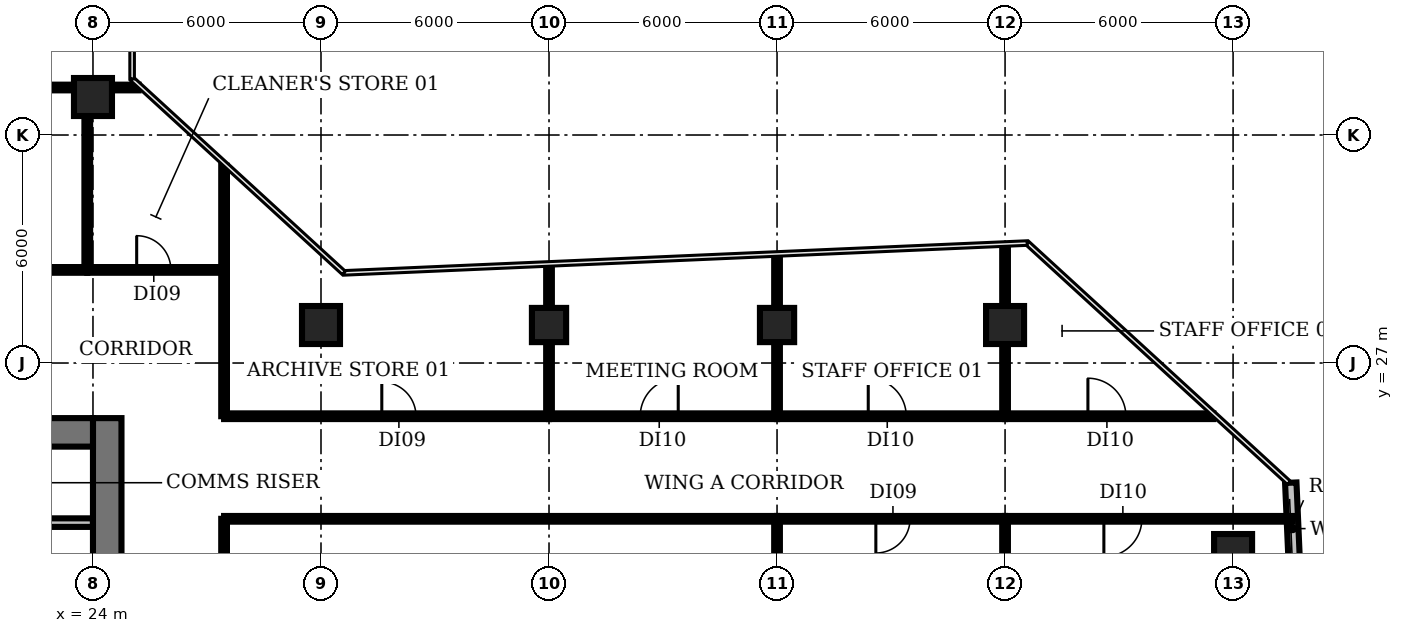
"""IFC4 building model, lengths in metres.
Left out: names, types, materials, properties, quantities, classifications, styles, units other than length and angle.
Written with IfcOpenShell. Run it as: python <this file> out.ifc"""

import sys

from ifc_helpers import new_model, si_unit, direction, frame, frame_2d, origin, origin_2d, place, context, subcontext, project, spatial, rectangle, circle, extrude, element, fill, save


model = new_model("IFC4")
c1 = context("Model", 3, precision=1e-05, world=origin(), true_north=direction((0.0, 1.0)))
c2 = subcontext(c1, "Body", "Model", "MODEL_VIEW")
j1 = project(units=[si_unit("LENGTHUNIT", "METRE"), si_unit("PLANEANGLEUNIT", "RADIAN")], contexts=[c1])
p1 = place(None, origin())
s1 = spatial("IfcSite", under=j1, at=p1, CompositionType="ELEMENT")
p2 = place(p1, origin())
s2 = spatial("IfcBuilding", under=s1, at=p2, CompositionType="ELEMENT")
p3 = place(p2, frame((0.0, 0.0, 100.4)))
s3 = spatial("IfcBuildingStorey", under=s2, at=p3, CompositionType="ELEMENT", Elevation=100.4)
for number, where, z_axis, x_axis in (
    (1, (24.0, 34.0, 0.0), (0.0, 0.0, 1.0), (1.0, 0.0, 0.0)),
    (2, (30.0, 28.0, 0.0), (0.0, 0.0, 1.0), (1.0, 0.0, 0.0)),
):
    element("IfcColumn", number, at=place(p3, frame(where, z_axis=z_axis, x_axis=x_axis)), inside=s3, PredefinedType="COLUMN", context=c2, shape_type="SweptSolid", body=[
        extrude(circle(Radius=0.5, at=origin_2d()), origin(), (0.0, 0.0, 1.0), 3.85),
    ])
for number, where, z_axis, x_axis in (
    (3, (36.0, 28.0, 0.0), (0.0, 0.0, 1.0), (1.0, 0.0, 0.0)),
    (4, (42.0, 28.0, 0.0), (0.0, 0.0, 1.0), (1.0, 0.0, 0.0)),
):
    element("IfcColumn", number, at=place(p3, frame(where, z_axis=z_axis, x_axis=x_axis)), inside=s3, PredefinedType="COLUMN", context=c2, shape_type="SweptSolid", body=[
        extrude(rectangle(XDim=0.9, YDim=0.9, at=origin_2d()), origin(), (0.0, 0.0, 1.0), 3.85),
    ])
for number, where, z_axis, x_axis in (
    (5, (48.0, 28.0, 0.0), (0.0, 0.0, 1.0), (1.0, 0.0, 0.0)),
    (6, (54.0, 22.0, 0.0), (0.0, 0.0, 1.0), (1.0, 0.0, 0.0)),
):
    element("IfcColumn", number, at=place(p3, frame(where, z_axis=z_axis, x_axis=x_axis)), inside=s3, PredefinedType="COLUMN", context=c2, shape_type="SweptSolid", body=[
        extrude(circle(Radius=0.5, at=origin_2d()), origin(), (0.0, 0.0, 1.0), 3.85),
    ])
p4 = place(p3, frame((55.623, 21.435, 0.0), z_axis=(0.0, 0.0, 1.0), x_axis=(-0.043625665955, 0.999047947433, 0.0)))
e7 = element("IfcWall", 7, at=p4, inside=s3, PredefinedType="SOLIDWALL", context=c2, shape_type="SweptSolid", body=[
    extrude(rectangle(XDim=2.417, YDim=0.3, at=frame_2d((1.209, 0.0))), origin(), (0.0, 0.0, 1.0), 3.85),
])
p5 = place(p3, frame((9.4, 22.8, 0.0), z_axis=(0.0, 0.0, 1.0), x_axis=(1.0, 0.0, 0.0)))
e8 = element("IfcWall", 8, at=p5, inside=s3, PredefinedType="PARTITIONING", context=c2, shape_type="SweptSolid", body=[
    extrude(rectangle(XDim=14.6, YDim=0.225, at=frame_2d((7.3, 0.0))), origin(), (0.0, 0.0, 1.0), 3.85),
])
p6 = place(p3, frame((24.375, 25.55, 0.0), z_axis=(0.0, 0.0, 1.0), x_axis=(0.0, -1.0, 0.0)))
e9 = element("IfcWall", 9, at=p6, inside=s3, PredefinedType="SHEAR", context=c2, shape_type="SweptSolid", body=[
    extrude(rectangle(XDim=21.13, YDim=0.75, at=frame_2d((10.565, 0.0))), origin(), (0.0, 0.0, 1.0), 3.85),
])
p7 = place(p6, frame((18.4, 0.0, 0.0)))
e10 = element("IfcOpeningElement", 10, at=p7, cuts=e9, PredefinedType="OPENING", context=c2, shape_type="SweptSolid", body=[
    extrude(rectangle(XDim=1.5, YDim=2.1, at=frame_2d((0.75, 1.05))), frame((0.0, 0.385, 0.0), z_axis=(0.0, -1.0, 0.0), x_axis=(1.0, 0.0, 0.0)), (0.0, 0.0, 1.0), 0.77),
])
p8 = place(p6, frame((12.3, 0.0, 0.0)))
e11 = element("IfcOpeningElement", 11, at=p8, cuts=e9, PredefinedType="OPENING", context=c2, shape_type="SweptSolid", body=[
    extrude(rectangle(XDim=0.9, YDim=2.1, at=frame_2d((0.45, 1.05))), frame((0.0, 0.385, 0.0), z_axis=(0.0, -1.0, 0.0), x_axis=(1.0, 0.0, 0.0)), (0.0, 0.0, 1.0), 0.77),
])
p9 = place(p6, frame((6.3, 0.0, 0.0)))
e12 = element("IfcOpeningElement", 12, at=p9, cuts=e9, PredefinedType="OPENING", context=c2, shape_type="SweptSolid", body=[
    extrude(rectangle(XDim=2.0, YDim=2.1, at=frame_2d((1.0, 1.05))), frame((0.0, 0.385, 0.0), z_axis=(0.0, -1.0, 0.0), x_axis=(1.0, 0.0, 0.0)), (0.0, 0.0, 1.0), 0.77),
])
p10 = place(p3, frame((6.0, 25.175, 0.0), z_axis=(0.0, 0.0, 1.0), x_axis=(1.0, 0.0, 0.0)))
e13 = element("IfcWall", 13, at=p10, inside=s3, PredefinedType="SHEAR", context=c2, shape_type="SweptSolid", body=[
    extrude(rectangle(XDim=18.0, YDim=0.75, at=frame_2d((9.0, 0.0))), origin(), (0.0, 0.0, 1.0), 3.85),
])
p11 = place(p3, frame((10.35, 34.25, 0.0), z_axis=(0.0, 0.0, 1.0), x_axis=(1.0, 0.0, 0.0)))
e14 = element("IfcWall", 14, at=p11, inside=s3, PredefinedType="PARTITIONING", context=c2, shape_type="SweptSolid", body=[
    extrude(rectangle(XDim=14.85, YDim=0.15, at=frame_2d((7.425, 0.0))), origin(), (0.0, 0.0, 1.0), 2.83),
])
p12 = place(p3, frame((18.0, 29.45, 0.0), z_axis=(0.0, 0.0, 1.0), x_axis=(1.0, 0.0, 0.0)))
e15 = element("IfcWall", 15, at=p12, inside=s3, PredefinedType="PARTITIONING", context=c2, shape_type="SweptSolid", body=[
    extrude(rectangle(XDim=5.85, YDim=0.15, at=frame_2d((2.925, 0.0))), origin(), (0.0, 0.0, 1.0), 2.83),
])
p13 = place(p3, frame((23.85, 29.45, 0.0), z_axis=(0.0, 0.0, 1.0), x_axis=(0.0, 1.0, 0.0)))
e16 = element("IfcWall", 16, at=p13, inside=s3, PredefinedType="PARTITIONING", context=c2, shape_type="SweptSolid", body=[
    extrude(rectangle(XDim=4.8, YDim=0.15, at=frame_2d((2.4, 0.0))), origin(), (0.0, 0.0, 1.0), 2.83),
])
p14 = place(p3, frame((23.85, 29.45, 0.0), z_axis=(0.0, 0.0, 1.0), x_axis=(1.0, 0.0, 0.0)))
e17 = element("IfcWall", 17, at=p14, inside=s3, PredefinedType="PARTITIONING", context=c2, shape_type="SweptSolid", body=[
    extrude(rectangle(XDim=3.6, YDim=0.15, at=frame_2d((1.8, 0.0))), origin(), (0.0, 0.0, 1.0), 2.83),
])
p15 = place(p14, frame((1.3, 0.0, 0.0)))
e18 = element("IfcOpeningElement", 18, at=p15, cuts=e17, PredefinedType="OPENING", context=c2, shape_type="SweptSolid", body=[
    extrude(rectangle(XDim=0.9, YDim=2.1, at=frame_2d((0.45, 1.05))), frame((0.0, 0.085, 0.0), z_axis=(0.0, -1.0, 0.0), x_axis=(1.0, 0.0, 0.0)), (0.0, 0.0, 1.0), 0.17),
])
p16 = place(p3, frame((27.45, 22.9, 0.0), z_axis=(0.0, 0.0, 1.0), x_axis=(0.0, -1.0, 0.0)))
e19 = element("IfcWall", 19, at=p16, inside=s3, PredefinedType="PARTITIONING", context=c2, shape_type="SweptSolid", body=[
    extrude(rectangle(XDim=19.88, YDim=0.15, at=frame_2d((9.94, 0.0))), origin(), (0.0, 0.0, 1.0), 2.83),
])
p17 = place(p16, frame((9.48, 0.0, 0.0)))
e20 = element("IfcOpeningElement", 20, at=p17, cuts=e19, PredefinedType="OPENING", context=c2, shape_type="SweptSolid", body=[
    extrude(rectangle(XDim=1.2, YDim=2.1, at=frame_2d((0.6, 1.05))), frame((0.0, 0.085, 0.0), z_axis=(0.0, -1.0, 0.0), x_axis=(1.0, 0.0, 0.0)), (0.0, 0.0, 1.0), 0.17),
])
p18 = place(p3, frame((27.45, 22.9, 0.0), z_axis=(0.0, 0.0, 1.0), x_axis=(1.0, 0.0, 0.0)))
e21 = element("IfcWall", 21, at=p18, inside=s3, PredefinedType="PARTITIONING", context=c2, shape_type="SweptSolid", body=[
    extrude(rectangle(XDim=14.55, YDim=0.15, at=frame_2d((7.275, 0.0))), origin(), (0.0, 0.0, 1.0), 2.83),
])
p19 = place(p3, frame((27.45, 25.6, 0.0), z_axis=(0.0, 0.0, 1.0), x_axis=(0.0, 1.0, 0.0)))
e22 = element("IfcWall", 22, at=p19, inside=s3, PredefinedType="PARTITIONING", context=c2, shape_type="SweptSolid", body=[
    extrude(rectangle(XDim=3.85, YDim=0.15, at=frame_2d((1.925, 0.0))), origin(), (0.0, 0.0, 1.0), 2.83),
])
p20 = place(p3, frame((27.45, 25.6, 0.0), z_axis=(0.0, 0.0, 1.0), x_axis=(1.0, 0.0, 0.0)))
e23 = element("IfcWall", 23, at=p20, inside=s3, PredefinedType="PARTITIONING", context=c2, shape_type="SweptSolid", body=[
    extrude(rectangle(XDim=8.55, YDim=0.15, at=frame_2d((4.275, 0.0))), origin(), (0.0, 0.0, 1.0), 2.83),
])
p21 = place(p20, frame((4.15, 0.0, 0.0)))
e24 = element("IfcOpeningElement", 24, at=p21, cuts=e23, PredefinedType="OPENING", context=c2, shape_type="SweptSolid", body=[
    extrude(rectangle(XDim=0.9, YDim=2.1, at=frame_2d((0.45, 1.05))), frame((0.0, 0.085, 0.0), z_axis=(0.0, -1.0, 0.0), x_axis=(1.0, 0.0, 0.0)), (0.0, 0.0, 1.0), 0.17),
])
p22 = place(p3, frame((27.45, 29.45, 0.0), z_axis=(0.0, 0.0, 1.0), x_axis=(0.0, 1.0, 0.0)))
e25 = element("IfcWall", 25, at=p22, inside=s3, PredefinedType="PARTITIONING", context=c2, shape_type="SweptSolid", body=[
    extrude(rectangle(XDim=2.74, YDim=0.15, at=frame_2d((1.37, 0.0))), origin(), (0.0, 0.0, 1.0), 2.83),
])
p23 = place(p3, frame((36.0, 25.6, 0.0), z_axis=(0.0, 0.0, 1.0), x_axis=(0.0, 1.0, 0.0)))
e26 = element("IfcWall", 26, at=p23, inside=s3, PredefinedType="PARTITIONING", context=c2, shape_type="SweptSolid", body=[
    extrude(rectangle(XDim=3.96, YDim=0.15, at=frame_2d((1.98, 0.0))), origin(), (0.0, 0.0, 1.0), 2.83),
])
p24 = place(p3, frame((36.0, 25.6, 0.0), z_axis=(0.0, 0.0, 1.0), x_axis=(1.0, 0.0, 0.0)))
e27 = element("IfcWall", 27, at=p24, inside=s3, PredefinedType="PARTITIONING", context=c2, shape_type="SweptSolid", body=[
    extrude(rectangle(XDim=6.0, YDim=0.15, at=frame_2d((3.0, 0.0))), origin(), (0.0, 0.0, 1.0), 2.83),
])
p25 = place(p24, frame((2.4, 0.0, 0.0)))
e28 = element("IfcOpeningElement", 28, at=p25, cuts=e27, PredefinedType="OPENING", context=c2, shape_type="SweptSolid", body=[
    extrude(rectangle(XDim=1.0, YDim=2.1, at=frame_2d((0.5, 1.05))), frame((0.0, 0.085, 0.0), z_axis=(0.0, -1.0, 0.0), x_axis=(1.0, 0.0, 0.0)), (0.0, 0.0, 1.0), 0.17),
])
p26 = place(p3, frame((42.0, 3.02, 0.0), z_axis=(0.0, 0.0, 1.0), x_axis=(0.0, 1.0, 0.0)))
e29 = element("IfcWall", 29, at=p26, inside=s3, PredefinedType="PARTITIONING", context=c2, shape_type="SweptSolid", body=[
    extrude(rectangle(XDim=19.88, YDim=0.15, at=frame_2d((9.94, 0.0))), origin(), (0.0, 0.0, 1.0), 2.83),
])
p27 = place(p3, frame((42.0, 25.6, 0.0), z_axis=(0.0, 0.0, 1.0), x_axis=(0.0, 1.0, 0.0)))
e30 = element("IfcWall", 30, at=p27, inside=s3, PredefinedType="PARTITIONING", context=c2, shape_type="SweptSolid", body=[
    extrude(rectangle(XDim=4.22, YDim=0.15, at=frame_2d((2.11, 0.0))), origin(), (0.0, 0.0, 1.0), 2.83),
])
p28 = place(p3, frame((42.0, 25.6, 0.0), z_axis=(0.0, 0.0, 1.0), x_axis=(1.0, 0.0, 0.0)))
e31 = element("IfcWall", 31, at=p28, inside=s3, PredefinedType="PARTITIONING", context=c2, shape_type="SweptSolid", body=[
    extrude(rectangle(XDim=6.0, YDim=0.15, at=frame_2d((3.0, 0.0))), origin(), (0.0, 0.0, 1.0), 2.83),
])
p29 = place(p28, frame((2.4, 0.0, 0.0)))
e32 = element("IfcOpeningElement", 32, at=p29, cuts=e31, PredefinedType="OPENING", context=c2, shape_type="SweptSolid", body=[
    extrude(rectangle(XDim=1.0, YDim=2.1, at=frame_2d((0.5, 1.05))), frame((0.0, 0.085, 0.0), z_axis=(0.0, -1.0, 0.0), x_axis=(1.0, 0.0, 0.0)), (0.0, 0.0, 1.0), 0.17),
])
p30 = place(p3, frame((48.0, 3.02, 0.0), z_axis=(0.0, 0.0, 1.0), x_axis=(0.0, 1.0, 0.0)))
e33 = element("IfcWall", 33, at=p30, inside=s3, PredefinedType="PARTITIONING", context=c2, shape_type="SweptSolid", body=[
    extrude(rectangle(XDim=19.88, YDim=0.15, at=frame_2d((9.94, 0.0))), origin(), (0.0, 0.0, 1.0), 2.83),
])
p31 = place(p3, frame((48.0, 22.9, 0.0), z_axis=(0.0, 0.0, 1.0), x_axis=(-1.0, 0.0, 0.0)))
e34 = element("IfcWall", 34, at=p31, inside=s3, PredefinedType="PARTITIONING", context=c2, shape_type="SweptSolid", body=[
    extrude(rectangle(XDim=6.0, YDim=0.15, at=frame_2d((3.0, 0.0))), origin(), (0.0, 0.0, 1.0), 2.83),
])
p32 = place(p31, frame((2.5, 0.0, 0.0)))
e35 = element("IfcOpeningElement", 35, at=p32, cuts=e34, PredefinedType="OPENING", context=c2, shape_type="SweptSolid", body=[
    extrude(rectangle(XDim=0.9, YDim=2.1, at=frame_2d((0.45, 1.05))), frame((0.0, 0.085, 0.0), z_axis=(0.0, -1.0, 0.0), x_axis=(1.0, 0.0, 0.0)), (0.0, 0.0, 1.0), 0.17),
])
p33 = place(p3, frame((48.0, 25.6, 0.0), z_axis=(0.0, 0.0, 1.0), x_axis=(0.0, 1.0, 0.0)))
e36 = element("IfcWall", 36, at=p33, inside=s3, PredefinedType="PARTITIONING", context=c2, shape_type="SweptSolid", body=[
    extrude(rectangle(XDim=4.48, YDim=0.15, at=frame_2d((2.24, 0.0))), origin(), (0.0, 0.0, 1.0), 2.83),
])
p34 = place(p3, frame((48.0, 25.6, 0.0), z_axis=(0.0, 0.0, 1.0), x_axis=(1.0, 0.0, 0.0)))
e37 = element("IfcWall", 37, at=p34, inside=s3, PredefinedType="PARTITIONING", context=c2, shape_type="SweptSolid", body=[
    extrude(rectangle(XDim=5.48, YDim=0.15, at=frame_2d((2.74, 0.0))), origin(), (0.0, 0.0, 1.0), 2.83),
])
p35 = place(p34, frame((2.18, 0.0, 0.0)))
e38 = element("IfcOpeningElement", 38, at=p35, cuts=e37, PredefinedType="OPENING", context=c2, shape_type="SweptSolid", body=[
    extrude(rectangle(XDim=1.0, YDim=2.1, at=frame_2d((0.5, 1.05))), frame((0.0, 0.085, 0.0), z_axis=(0.0, -1.0, 0.0), x_axis=(1.0, 0.0, 0.0)), (0.0, 0.0, 1.0), 0.17),
])
p36 = place(p3, frame((55.57, 22.9, 0.0), z_axis=(0.0, 0.0, 1.0), x_axis=(-1.0, 0.0, 0.0)))
e39 = element("IfcWall", 39, at=p36, inside=s3, PredefinedType="PARTITIONING", context=c2, shape_type="SweptSolid", body=[
    extrude(rectangle(XDim=7.57, YDim=0.15, at=frame_2d((3.785, 0.0))), origin(), (0.0, 0.0, 1.0), 2.83),
])
p37 = place(p36, frame((3.97, 0.0, 0.0)))
e40 = element("IfcOpeningElement", 40, at=p37, cuts=e39, PredefinedType="OPENING", context=c2, shape_type="SweptSolid", body=[
    extrude(rectangle(XDim=1.0, YDim=2.1, at=frame_2d((0.5, 1.05))), frame((0.0, 0.085, 0.0), z_axis=(0.0, -1.0, 0.0), x_axis=(1.0, 0.0, 0.0)), (0.0, 0.0, 1.0), 0.17),
])
p38 = place(p15, origin())
e41 = element("IfcDoor", 41, at=p38, inside=s3, OperationType="SINGLE_SWING_LEFT", PredefinedType="DOOR", context=c2, shape_type="SweptSolid", body=[
    extrude(rectangle(XDim=0.9, YDim=2.1, at=frame_2d((0.45, 1.05))), frame((0.0, 0.025, 0.0), z_axis=(0.0, -1.0, 0.0), x_axis=(1.0, 0.0, 0.0)), (0.0, 0.0, 1.0), 0.05),
])
fill(e18, e41)
p39 = place(p21, origin())
e42 = element("IfcDoor", 42, at=p39, inside=s3, OperationType="SINGLE_SWING_LEFT", PredefinedType="DOOR", context=c2, shape_type="SweptSolid", body=[
    extrude(rectangle(XDim=0.9, YDim=2.1, at=frame_2d((0.45, 1.05))), frame((0.0, 0.025, 0.0), z_axis=(0.0, -1.0, 0.0), x_axis=(1.0, 0.0, 0.0)), (0.0, 0.0, 1.0), 0.05),
])
fill(e24, e42)
p40 = place(p25, origin())
e43 = element("IfcDoor", 43, at=p40, inside=s3, OperationType="SINGLE_SWING_RIGHT", PredefinedType="DOOR", context=c2, shape_type="SweptSolid", body=[
    extrude(rectangle(XDim=1.0, YDim=2.1, at=frame_2d((0.5, 1.05))), frame((0.0, 0.025, 0.0), z_axis=(0.0, -1.0, 0.0), x_axis=(1.0, 0.0, 0.0)), (0.0, 0.0, 1.0), 0.05),
])
fill(e28, e43)
p41 = place(p29, origin())
e44 = element("IfcDoor", 44, at=p41, inside=s3, OperationType="SINGLE_SWING_LEFT", PredefinedType="DOOR", context=c2, shape_type="SweptSolid", body=[
    extrude(rectangle(XDim=1.0, YDim=2.1, at=frame_2d((0.5, 1.05))), frame((0.0, 0.025, 0.0), z_axis=(0.0, -1.0, 0.0), x_axis=(1.0, 0.0, 0.0)), (0.0, 0.0, 1.0), 0.05),
])
fill(e32, e44)
p42 = place(p32, origin())
e45 = element("IfcDoor", 45, at=p42, inside=s3, OperationType="SINGLE_SWING_RIGHT", PredefinedType="DOOR", context=c2, shape_type="SweptSolid", body=[
    extrude(rectangle(XDim=0.9, YDim=2.1, at=frame_2d((0.45, 1.05))), frame((0.0, 0.025, 0.0), z_axis=(0.0, -1.0, 0.0), x_axis=(1.0, 0.0, 0.0)), (0.0, 0.0, 1.0), 0.05),
])
fill(e35, e45)
p43 = place(p35, origin())
e46 = element("IfcDoor", 46, at=p43, inside=s3, OperationType="SINGLE_SWING_LEFT", PredefinedType="DOOR", context=c2, shape_type="SweptSolid", body=[
    extrude(rectangle(XDim=1.0, YDim=2.1, at=frame_2d((0.5, 1.05))), frame((0.0, 0.025, 0.0), z_axis=(0.0, -1.0, 0.0), x_axis=(1.0, 0.0, 0.0)), (0.0, 0.0, 1.0), 0.05),
])
fill(e38, e46)
p44 = place(p37, origin())
e47 = element("IfcDoor", 47, at=p44, inside=s3, OperationType="SINGLE_SWING_RIGHT", PredefinedType="DOOR", context=c2, shape_type="SweptSolid", body=[
    extrude(rectangle(XDim=1.0, YDim=2.1, at=frame_2d((0.5, 1.05))), frame((0.0, 0.025, 0.0), z_axis=(0.0, -1.0, 0.0), x_axis=(1.0, 0.0, 0.0)), (0.0, 0.0, 1.0), 0.05),
])
fill(e40, e47)
save(model, sys.argv[1])
